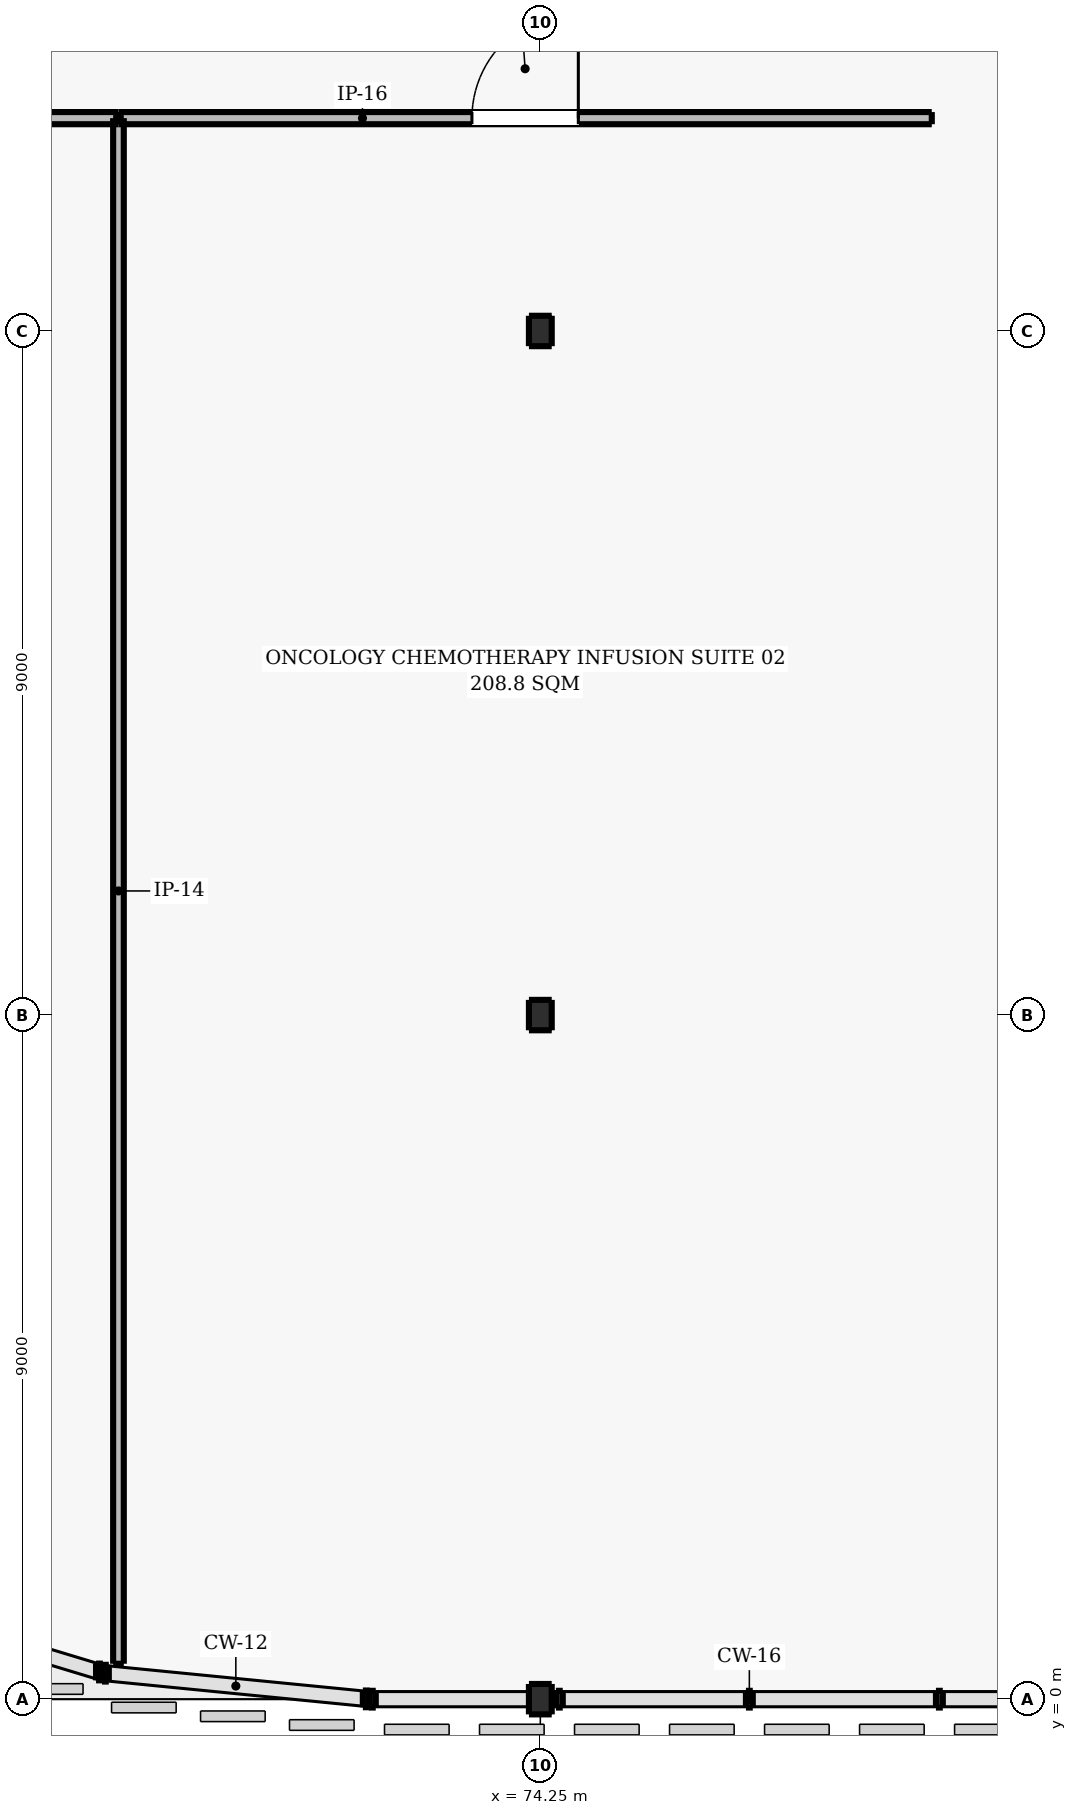
"""IFC4 building model, lengths in metres.
Left out: names, types, materials, properties, quantities, classifications, styles, units other than length and angle.
Written with IfcOpenShell. Run it as: python <this file> out.ifc"""

import sys

from ifc_helpers import new_model, si_unit, direction, frame, frame_2d, origin, origin_2d, place, context, subcontext, project, spatial, rectangle, i_section, extrude, element, fill, save


model = new_model("IFC4")
c1 = context("Model", 3, precision=1e-05, world=origin(), true_north=direction((0.0, 1.0)))
c2 = subcontext(c1, "Body", "Model", "MODEL_VIEW")
j1 = project(units=[si_unit("LENGTHUNIT", "METRE"), si_unit("PLANEANGLEUNIT", "RADIAN")], contexts=[c1])
p1 = place(None, origin())
s1 = spatial("IfcSite", under=j1, at=p1, CompositionType="ELEMENT")
p2 = place(p1, origin())
s2 = spatial("IfcBuilding", under=s1, at=p2, CompositionType="ELEMENT")
p3 = place(p2, frame((0.0, 0.0, 9.6)))
s3 = spatial("IfcBuildingStorey", under=s2, at=p3, CompositionType="ELEMENT", Elevation=9.6)
for number, where, z_axis, x_axis in (
    (1, (74.25, 0.0, 0.0), (0.0, 0.0, 1.0), (1.0, 0.0, 0.0)),
    (2, (74.25, 9.0, 0.0), (0.0, 0.0, 1.0), (1.0, 0.0, 0.0)),
    (3, (74.25, 18.0, 0.0), (0.0, 0.0, 1.0), (1.0, 0.0, 0.0)),
):
    element("IfcColumn", number, at=place(p3, frame(where, z_axis=z_axis, x_axis=x_axis)), inside=s3, PredefinedType="COLUMN", context=c2, shape_type="SweptSolid", body=[
        extrude(i_section(OverallWidth=0.3, OverallDepth=0.4, WebThickness=0.013, FlangeThickness=0.024, FilletRadius=0.027, at=origin_2d()), origin(), (0.0, 0.0, 1.0), 4.2),
    ])
p4 = place(p3, frame((58.0, 20.8, 0.0), z_axis=(0.0, 0.0, 1.0), x_axis=(1.0, 0.0, 0.0)))
e4 = element("IfcWall", 4, at=p4, inside=s3, PredefinedType="PARTITIONING", context=c2, shape_type="SweptSolid", body=[
    extrude(rectangle(XDim=10.7, YDim=0.16, at=frame_2d((5.35, 0.0))), origin(), (0.0, 0.0, 1.0), 3.93),
])
p5 = place(p4, frame((4.65, 0.0, 0.0)))
e5 = element("IfcOpeningElement", 5, at=p5, cuts=e4, PredefinedType="OPENING", context=c2, shape_type="SweptSolid", body=[
    extrude(rectangle(XDim=1.4, YDim=2.2, at=frame_2d((0.7, 1.1))), frame((0.0, 0.09, 0.0), z_axis=(0.0, -1.0, 0.0), x_axis=(1.0, 0.0, 0.0)), (0.0, 0.0, 1.0), 0.18),
])
p6 = place(p3, frame((68.7, 0.466, 0.0), z_axis=(0.0, 0.0, 1.0), x_axis=(0.0, 1.0, 0.0)))
e6 = element("IfcWall", 6, at=p6, inside=s3, PredefinedType="PARTITIONING", context=c2, shape_type="SweptSolid", body=[
    extrude(rectangle(XDim=20.334, YDim=0.14, at=frame_2d((10.167, 0.0))), origin(), (0.0, 0.0, 1.0), 3.44),
])
p7 = place(p3, frame((68.7, 20.8, 0.0), z_axis=(0.0, 0.0, 1.0), x_axis=(1.0, 0.0, 0.0)))
e7 = element("IfcWall", 7, at=p7, inside=s3, PredefinedType="PARTITIONING", context=c2, shape_type="SweptSolid", body=[
    extrude(rectangle(XDim=10.7, YDim=0.16, at=frame_2d((5.35, 0.0))), origin(), (0.0, 0.0, 1.0), 3.93),
])
p8 = place(p7, frame((4.65, 0.0, 0.0)))
e8 = element("IfcOpeningElement", 8, at=p8, cuts=e7, PredefinedType="OPENING", context=c2, shape_type="SweptSolid", body=[
    extrude(rectangle(XDim=1.4, YDim=2.2, at=frame_2d((0.7, 1.1))), frame((0.0, 0.09, 0.0), z_axis=(0.0, -1.0, 0.0), x_axis=(1.0, 0.0, 0.0)), (0.0, 0.0, 1.0), 0.18),
])
p9 = place(p8, origin())
e9 = element("IfcDoor", 9, at=p9, inside=s3, OperationType="SINGLE_SWING_RIGHT", PredefinedType="DOOR", context=c2, shape_type="SweptSolid", body=[
    extrude(rectangle(XDim=1.4, YDim=2.2, at=frame_2d((0.7, 1.1))), frame((0.0, 0.025, 0.0), z_axis=(0.0, -1.0, 0.0), x_axis=(1.0, 0.0, 0.0)), (0.0, 0.0, 1.0), 0.05),
])
fill(e8, e9)
save(model, sys.argv[1])
